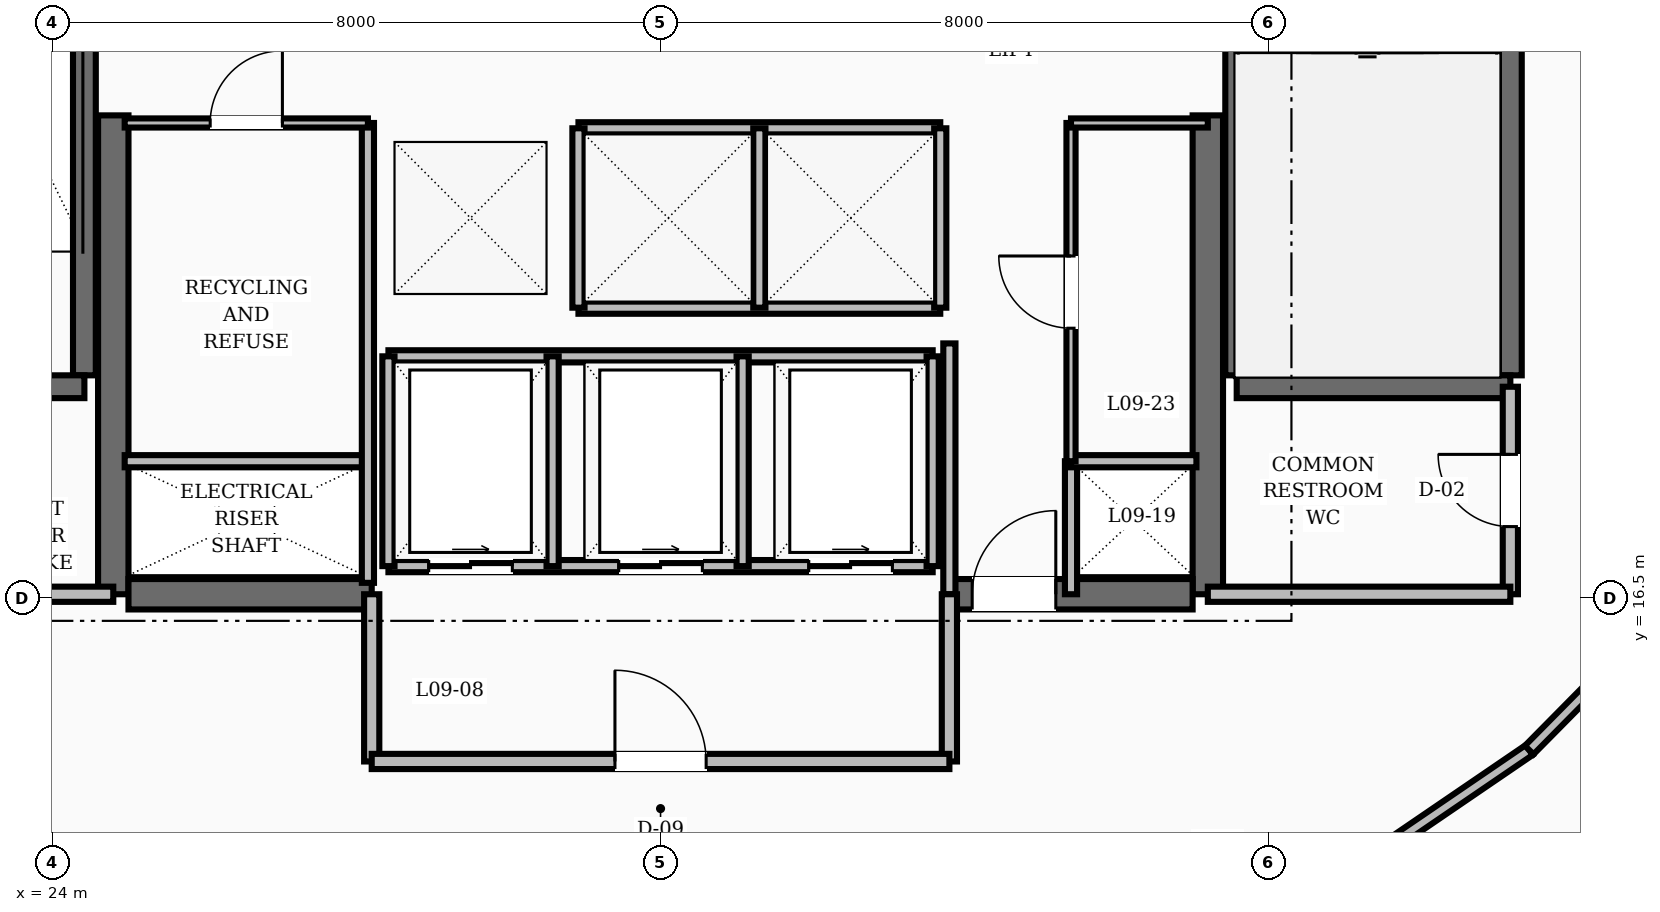
"""IFC4 building model, lengths in metres.
Left out: names, types, materials, properties, quantities, classifications, styles, units other than length and angle.
Written with IfcOpenShell. Run it as: python <this file> out.ifc"""

import sys

from ifc_helpers import new_model, si_unit, direction, frame, frame_2d, origin, place, context, subcontext, project, spatial, rectangle, extrude, element, fill, save


model = new_model("IFC4")
c1 = context("Model", 3, precision=1e-05, world=origin(), true_north=direction((0.0, 1.0)))
c2 = subcontext(c1, "Body", "Model", "MODEL_VIEW")
j1 = project(units=[si_unit("LENGTHUNIT", "METRE"), si_unit("PLANEANGLEUNIT", "RADIAN")], contexts=[c1])
p1 = place(None, origin())
s1 = spatial("IfcSite", under=j1, at=p1, CompositionType="ELEMENT")
p2 = place(p1, origin())
s2 = spatial("IfcBuilding", under=s1, at=p2, CompositionType="ELEMENT")
p3 = place(p2, frame((0.0, 0.0, 41.2)))
s3 = spatial("IfcBuildingStorey", under=s2, at=p3, CompositionType="ELEMENT", Elevation=41.2)
for number, where, z_axis, x_axis in (
    (1, (24.8, 16.55, 0.0), (0.0, 0.0, 1.0), (0.0, 1.0, 0.0)),
    (2, (39.2, 16.55, 0.0), (0.0, 0.0, 1.0), (0.0, 1.0, 0.0)),
):
    element("IfcWall", number, at=place(p3, frame(where, z_axis=z_axis, x_axis=x_axis)), inside=s3, PredefinedType="SHEAR", context=c2, shape_type="SweptSolid", body=[
        extrude(rectangle(XDim=6.3, YDim=0.4, at=frame_2d((3.15, 0.0))), origin(), (0.0, 0.0, 1.0), 3.6),
    ])
p4 = place(p3, frame((25.0, 16.55, 0.0), z_axis=(0.0, 0.0, 1.0), x_axis=(1.0, 0.0, 0.0)))
e3 = element("IfcWall", 3, at=p4, inside=s3, PredefinedType="SHEAR", context=c2, shape_type="SweptSolid", body=[
    extrude(rectangle(XDim=3.2, YDim=0.4, at=frame_2d((1.6, 0.0))), origin(), (0.0, 0.0, 1.0), 3.6),
])
p5 = place(p3, frame((35.8, 16.55, 0.0), z_axis=(0.0, 0.0, 1.0), x_axis=(1.0, 0.0, 0.0)))
e4 = element("IfcWall", 4, at=p5, inside=s3, PredefinedType="SHEAR", context=c2, shape_type="SweptSolid", body=[
    extrude(rectangle(XDim=3.2, YDim=0.4, at=frame_2d((1.6, 0.0))), origin(), (0.0, 0.0, 1.0), 3.6),
])
p6 = place(p5, frame((0.3, 0.0, 0.0)))
e5 = element("IfcOpeningElement", 5, at=p6, cuts=e4, PredefinedType="OPENING", context=c2, shape_type="SweptSolid", body=[
    extrude(rectangle(XDim=1.1, YDim=2.1, at=frame_2d((0.55, 1.05))), frame((0.0, 0.21, 0.0), z_axis=(0.0, -1.0, 0.0), x_axis=(1.0, 0.0, 0.0)), (0.0, 0.0, 1.0), 0.42),
])
p7 = place(p3, frame((24.42, 19.43, 0.0), z_axis=(0.0, 0.0, 1.0), x_axis=(0.0, 1.0, 0.0)))
e6 = element("IfcWall", 6, at=p7, inside=s3, PredefinedType="SHEAR", context=c2, shape_type="SweptSolid", body=[
    extrude(rectangle(XDim=8.74, YDim=0.3, at=frame_2d((4.37, 0.0))), origin(), (0.0, 0.0, 1.0), 3.6),
])
p8 = place(p3, frame((20.82, 19.28, 0.0), z_axis=(0.0, 0.0, 1.0), x_axis=(1.0, 0.0, 0.0)))
e7 = element("IfcWall", 7, at=p8, inside=s3, PredefinedType="SHEAR", context=c2, shape_type="SweptSolid", body=[
    extrude(rectangle(XDim=3.6, YDim=0.3, at=frame_2d((1.8, 0.0))), origin(), (0.0, 0.0, 1.0), 3.6),
])
p9 = place(p8, frame((1.3, 0.0, 0.0)))
e8 = element("IfcOpeningElement", 8, at=p9, cuts=e7, PredefinedType="OPENING", context=c2, shape_type="SweptSolid", body=[
    extrude(rectangle(XDim=1.1, YDim=2.1, at=frame_2d((0.55, 1.05))), frame((0.0, 0.16, 0.0), z_axis=(0.0, -1.0, 0.0), x_axis=(1.0, 0.0, 0.0)), (0.0, 0.0, 1.0), 0.32),
])
for number, where, z_axis, x_axis in (
    (9, (43.18, 19.43, 0.0), (0.0, 0.0, 1.0), (0.0, 1.0, 0.0)),
    (10, (39.58, 19.43, 0.0), (0.0, 0.0, 1.0), (0.0, 1.0, 0.0)),
):
    element("IfcWall", number, at=place(p3, frame(where, z_axis=z_axis, x_axis=x_axis)), inside=s3, PredefinedType="SHEAR", context=c2, shape_type="SweptSolid", body=[
        extrude(rectangle(XDim=8.74, YDim=0.3, at=frame_2d((4.37, 0.0))), origin(), (0.0, 0.0, 1.0), 3.6),
    ])
p10 = place(p3, frame((39.58, 19.28, 0.0), z_axis=(0.0, 0.0, 1.0), x_axis=(1.0, 0.0, 0.0)))
e11 = element("IfcWall", 11, at=p10, inside=s3, PredefinedType="SHEAR", context=c2, shape_type="SweptSolid", body=[
    extrude(rectangle(XDim=3.6, YDim=0.3, at=frame_2d((1.8, 0.0))), origin(), (0.0, 0.0, 1.0), 3.6),
])
p11 = place(p3, frame((20.82, 16.55, 0.0), z_axis=(0.0, 0.0, 1.0), x_axis=(1.0, 0.0, 0.0)))
e12 = element("IfcWall", 12, at=p11, inside=s3, PredefinedType="SOLIDWALL", context=c2, shape_type="SweptSolid", body=[
    extrude(rectangle(XDim=3.98, YDim=0.2, at=frame_2d((1.99, 0.0))), origin(), (0.0, 0.0, 1.0), 2.61),
])
p12 = place(p3, frame((43.18, 16.55, 0.0), z_axis=(0.0, 0.0, 1.0), x_axis=(0.0, 1.0, 0.0)))
e13 = element("IfcWall", 13, at=p12, inside=s3, PredefinedType="SOLIDWALL", context=c2, shape_type="SweptSolid", body=[
    extrude(rectangle(XDim=2.73, YDim=0.2, at=frame_2d((1.365, 0.0))), origin(), (0.0, 0.0, 1.0), 2.61),
])
p13 = place(p12, frame((0.89, 0.0, 0.0)))
e14 = element("IfcOpeningElement", 14, at=p13, cuts=e13, PredefinedType="OPENING", context=c2, shape_type="SweptSolid", body=[
    extrude(rectangle(XDim=0.95, YDim=2.1, at=frame_2d((0.475, 1.05))), frame((0.0, 0.11, 0.0), z_axis=(0.0, -1.0, 0.0), x_axis=(1.0, 0.0, 0.0)), (0.0, 0.0, 1.0), 0.22),
])
p14 = place(p3, frame((39.2, 16.55, 0.0), z_axis=(0.0, 0.0, 1.0), x_axis=(1.0, 0.0, 0.0)))
e15 = element("IfcWall", 15, at=p14, inside=s3, PredefinedType="SOLIDWALL", context=c2, shape_type="SweptSolid", body=[
    extrude(rectangle(XDim=3.98, YDim=0.2, at=frame_2d((1.99, 0.0))), origin(), (0.0, 0.0, 1.0), 2.61),
])
p15 = place(p3, frame((35.8, 16.55, 0.0), z_axis=(0.0, 0.0, 1.0), x_axis=(0.0, 1.0, 0.0)))
e16 = element("IfcWall", 16, at=p15, inside=s3, PredefinedType="SOLIDWALL", context=c2, shape_type="SweptSolid", body=[
    extrude(rectangle(XDim=3.3, YDim=0.16, at=frame_2d((1.65, 0.0))), origin(), (0.0, 0.0, 1.0), 2.61),
])
p16 = place(p3, frame((37.4, 16.55, 0.0), z_axis=(0.0, 0.0, 1.0), x_axis=(0.0, 1.0, 0.0)))
e17 = element("IfcWall", 17, at=p16, inside=s3, PredefinedType="SOLIDWALL", context=c2, shape_type="SweptSolid", body=[
    extrude(rectangle(XDim=1.75, YDim=0.16, at=frame_2d((0.875, 0.0))), origin(), (0.0, 0.0, 1.0), 2.61),
])
for number, where, z_axis, x_axis in (
    (18, (28.2, 14.35, 0.0), (0.0, 0.0, 1.0), (0.0, 1.0, 0.0)),
    (19, (35.8, 14.35, 0.0), (0.0, 0.0, 1.0), (0.0, 1.0, 0.0)),
):
    element("IfcWall", number, at=place(p3, frame(where, z_axis=z_axis, x_axis=x_axis)), inside=s3, PredefinedType="SOLIDWALL", context=c2, shape_type="SweptSolid", body=[
        extrude(rectangle(XDim=2.2, YDim=0.2, at=frame_2d((1.1, 0.0))), origin(), (0.0, 0.0, 1.0), 2.61),
    ])
p17 = place(p3, frame((28.2, 14.35, 0.0), z_axis=(0.0, 0.0, 1.0), x_axis=(1.0, 0.0, 0.0)))
e20 = element("IfcWall", 20, at=p17, inside=s3, PredefinedType="SOLIDWALL", context=c2, shape_type="SweptSolid", body=[
    extrude(rectangle(XDim=7.6, YDim=0.2, at=frame_2d((3.8, 0.0))), origin(), (0.0, 0.0, 1.0), 2.61),
])
p18 = place(p17, frame((3.2, 0.0, 0.0)))
e21 = element("IfcOpeningElement", 21, at=p18, cuts=e20, PredefinedType="OPENING", context=c2, shape_type="SweptSolid", body=[
    extrude(rectangle(XDim=1.2, YDim=2.1, at=frame_2d((0.6, 1.05))), frame((0.0, 0.11, 0.0), z_axis=(0.0, -1.0, 0.0), x_axis=(1.0, 0.0, 0.0)), (0.0, 0.0, 1.0), 0.22),
])
for number, where, z_axis, x_axis in (
    (22, (30.92, 22.68, 0.0), (0.0, 0.0, 1.0), (1.0, 0.0, 0.0)),
    (23, (30.92, 20.32, 0.0), (0.0, 0.0, 1.0), (1.0, 0.0, 0.0)),
):
    element("IfcWall", number, at=place(p3, frame(where, z_axis=z_axis, x_axis=x_axis)), inside=s3, PredefinedType="SOLIDWALL", context=c2, shape_type="SweptSolid", body=[
        extrude(rectangle(XDim=4.76, YDim=0.16, at=frame_2d((2.38, 0.0))), origin(), (0.0, 0.0, 1.0), 2.61),
    ])
for number, where, z_axis, x_axis in (
    (24, (30.92, 20.32, 0.0), (0.0, 0.0, 1.0), (0.0, 1.0, 0.0)),
    (25, (33.3, 20.32, 0.0), (0.0, 0.0, 1.0), (0.0, 1.0, 0.0)),
    (26, (35.68, 20.32, 0.0), (0.0, 0.0, 1.0), (0.0, 1.0, 0.0)),
):
    element("IfcWall", number, at=place(p3, frame(where, z_axis=z_axis, x_axis=x_axis)), inside=s3, PredefinedType="SOLIDWALL", context=c2, shape_type="SweptSolid", body=[
        extrude(rectangle(XDim=2.36, YDim=0.16, at=frame_2d((1.18, 0.0))), origin(), (0.0, 0.0, 1.0), 2.61),
    ])
p19 = place(p3, frame((28.42, 16.92, 0.0), z_axis=(0.0, 0.0, 1.0), x_axis=(1.0, 0.0, 0.0)))
e27 = element("IfcWall", 27, at=p19, inside=s3, PredefinedType="SOLIDWALL", context=c2, shape_type="SweptSolid", body=[
    extrude(rectangle(XDim=7.16, YDim=0.16, at=frame_2d((3.58, 0.0))), origin(), (0.0, 0.0, 1.0), 2.61),
])
p20 = place(p19, frame((0.53, 0.0, 0.0)))
e28 = element("IfcOpeningElement", 28, at=p20, cuts=e27, PredefinedType="OPENING", context=c2, shape_type="SweptSolid", body=[
    extrude(rectangle(XDim=1.1, YDim=2.15, at=frame_2d((0.55, 1.075))), frame((0.0, 0.09, 0.0), z_axis=(0.0, -1.0, 0.0), x_axis=(1.0, 0.0, 0.0)), (0.0, 0.0, 1.0), 0.18),
])
p21 = place(p19, frame((3.03, 0.0, 0.0)))
e29 = element("IfcOpeningElement", 29, at=p21, cuts=e27, PredefinedType="OPENING", context=c2, shape_type="SweptSolid", body=[
    extrude(rectangle(XDim=1.1, YDim=2.15, at=frame_2d((0.55, 1.075))), frame((0.0, 0.09, 0.0), z_axis=(0.0, -1.0, 0.0), x_axis=(1.0, 0.0, 0.0)), (0.0, 0.0, 1.0), 0.18),
])
p22 = place(p19, frame((5.53, 0.0, 0.0)))
e30 = element("IfcOpeningElement", 30, at=p22, cuts=e27, PredefinedType="OPENING", context=c2, shape_type="SweptSolid", body=[
    extrude(rectangle(XDim=1.1, YDim=2.15, at=frame_2d((0.55, 1.075))), frame((0.0, 0.09, 0.0), z_axis=(0.0, -1.0, 0.0), x_axis=(1.0, 0.0, 0.0)), (0.0, 0.0, 1.0), 0.18),
])
p23 = place(p3, frame((28.42, 19.68, 0.0), z_axis=(0.0, 0.0, 1.0), x_axis=(1.0, 0.0, 0.0)))
e31 = element("IfcWall", 31, at=p23, inside=s3, PredefinedType="SOLIDWALL", context=c2, shape_type="SweptSolid", body=[
    extrude(rectangle(XDim=7.16, YDim=0.16, at=frame_2d((3.58, 0.0))), origin(), (0.0, 0.0, 1.0), 2.61),
])
for number, where, z_axis, x_axis in (
    (32, (28.42, 16.92, 0.0), (0.0, 0.0, 1.0), (0.0, 1.0, 0.0)),
    (33, (30.58, 16.92, 0.0), (0.0, 0.0, 1.0), (0.0, 1.0, 0.0)),
    (34, (33.08, 16.92, 0.0), (0.0, 0.0, 1.0), (0.0, 1.0, 0.0)),
    (35, (35.58, 16.92, 0.0), (0.0, 0.0, 1.0), (0.0, 1.0, 0.0)),
):
    element("IfcWall", number, at=place(p3, frame(where, z_axis=z_axis, x_axis=x_axis)), inside=s3, PredefinedType="SOLIDWALL", context=c2, shape_type="SweptSolid", body=[
        extrude(rectangle(XDim=2.76, YDim=0.16, at=frame_2d((1.38, 0.0))), origin(), (0.0, 0.0, 1.0), 2.61),
    ])
p24 = place(p3, frame((24.95, 18.3, 0.0), z_axis=(0.0, 0.0, 1.0), x_axis=(1.0, 0.0, 0.0)))
e36 = element("IfcWall", 36, at=p24, inside=s3, PredefinedType="SOLIDWALL", context=c2, shape_type="SweptSolid", body=[
    extrude(rectangle(XDim=3.2, YDim=0.16, at=frame_2d((1.6, 0.0))), origin(), (0.0, 0.0, 1.0), 2.61),
])
p25 = place(p3, frame((28.15, 16.7, 0.0), z_axis=(0.0, 0.0, 1.0), x_axis=(0.0, 1.0, 0.0)))
e37 = element("IfcWall", 37, at=p25, inside=s3, PredefinedType="SOLIDWALL", context=c2, shape_type="SweptSolid", body=[
    extrude(rectangle(XDim=6.05, YDim=0.16, at=frame_2d((3.025, 0.0))), origin(), (0.0, 0.0, 1.0), 2.61),
])
p26 = place(p3, frame((37.4, 18.3, 0.0), z_axis=(0.0, 0.0, 1.0), x_axis=(1.0, 0.0, 0.0)))
e38 = element("IfcWall", 38, at=p26, inside=s3, PredefinedType="SOLIDWALL", context=c2, shape_type="SweptSolid", body=[
    extrude(rectangle(XDim=1.65, YDim=0.16, at=frame_2d((0.825, 0.0))), origin(), (0.0, 0.0, 1.0), 2.61),
])
p27 = place(p3, frame((24.95, 22.75, 0.0), z_axis=(0.0, 0.0, 1.0), x_axis=(1.0, 0.0, 0.0)))
e39 = element("IfcWall", 39, at=p27, inside=s3, PredefinedType="PARTITIONING", context=c2, shape_type="SweptSolid", body=[
    extrude(rectangle(XDim=3.2, YDim=0.12, at=frame_2d((1.6, 0.0))), origin(), (0.0, 0.0, 1.0), 2.61),
])
p28 = place(p27, frame((1.125, 0.0, 0.0)))
e40 = element("IfcOpeningElement", 40, at=p28, cuts=e39, PredefinedType="OPENING", context=c2, shape_type="SweptSolid", body=[
    extrude(rectangle(XDim=0.95, YDim=2.1, at=frame_2d((0.475, 1.05))), frame((0.0, 0.07, 0.0), z_axis=(0.0, -1.0, 0.0), x_axis=(1.0, 0.0, 0.0)), (0.0, 0.0, 1.0), 0.14),
])
p29 = place(p3, frame((37.4, 18.3, 0.0), z_axis=(0.0, 0.0, 1.0), x_axis=(0.0, 1.0, 0.0)))
e41 = element("IfcWall", 41, at=p29, inside=s3, PredefinedType="PARTITIONING", context=c2, shape_type="SweptSolid", body=[
    extrude(rectangle(XDim=4.45, YDim=0.12, at=frame_2d((2.225, 0.0))), origin(), (0.0, 0.0, 1.0), 2.61),
])
p30 = place(p29, frame((1.75, 0.0, 0.0)))
e42 = element("IfcOpeningElement", 42, at=p30, cuts=e41, PredefinedType="OPENING", context=c2, shape_type="SweptSolid", body=[
    extrude(rectangle(XDim=0.95, YDim=2.1, at=frame_2d((0.475, 1.05))), frame((0.0, 0.07, 0.0), z_axis=(0.0, -1.0, 0.0), x_axis=(1.0, 0.0, 0.0)), (0.0, 0.0, 1.0), 0.14),
])
p31 = place(p3, frame((37.4, 22.75, 0.0), z_axis=(0.0, 0.0, 1.0), x_axis=(1.0, 0.0, 0.0)))
e43 = element("IfcWall", 43, at=p31, inside=s3, PredefinedType="PARTITIONING", context=c2, shape_type="SweptSolid", body=[
    extrude(rectangle(XDim=1.8, YDim=0.12, at=frame_2d((0.9, 0.0))), origin(), (0.0, 0.0, 1.0), 2.61),
])
p32 = place(p3, frame((40.979, 12.83, 0.0), z_axis=(0.0, 0.0, 1.0), x_axis=(0.826112340767, 0.563505457323, 0.0)))
e44 = element("IfcWall", 44, at=p32, inside=s3, PredefinedType="SOLIDWALL", context=c2, shape_type="SweptSolid", body=[
    extrude(rectangle(XDim=2.965, YDim=0.16, at=frame_2d((1.482, 0.0))), origin(), (0.0, 0.0, 1.0), 2.61),
])
p33 = place(p3, frame((43.428, 14.501, 0.0), z_axis=(0.0, 0.0, 1.0), x_axis=(0.702569520063, 0.711615113301, 0.0)))
e45 = element("IfcWall", 45, at=p33, inside=s3, PredefinedType="SOLIDWALL", context=c2, shape_type="SweptSolid", body=[
    extrude(rectangle(XDim=2.861, YDim=0.16, at=frame_2d((1.43, 0.0))), origin(), (0.0, 0.0, 1.0), 2.61),
])
p34 = place(p3, frame((43.877, 9.552, 0.0), z_axis=(0.0, 0.0, 1.0), x_axis=(0.775978393893, 0.630759488404, 0.0)))
e46 = element("IfcWall", 46, at=p34, inside=s3, PredefinedType="PARTITIONING", context=c2, shape_type="SweptSolid", body=[
    extrude(rectangle(XDim=7.601, YDim=0.12, at=frame_2d((3.8, 0.0))), origin(), (0.0, 0.0, 1.0), 2.61),
])
p35 = place(p34, frame((3.325, 0.0, 0.0)))
e47 = element("IfcOpeningElement", 47, at=p35, cuts=e46, PredefinedType="OPENING", context=c2, shape_type="SweptSolid", body=[
    extrude(rectangle(XDim=0.95, YDim=2.1, at=frame_2d((0.475, 1.05))), frame((0.0, 0.07, 0.0), z_axis=(0.0, -1.0, 0.0), x_axis=(1.0, 0.0, 0.0)), (0.0, 0.0, 1.0), 0.14),
])
p36 = place(p13, origin())
e48 = element("IfcDoor", 48, at=p36, inside=s3, OperationType="SINGLE_SWING_RIGHT", PredefinedType="DOOR", context=c2, shape_type="SweptSolid", body=[
    extrude(rectangle(XDim=0.95, YDim=2.1, at=frame_2d((0.475, 1.05))), frame((0.0, 0.025, 0.0), z_axis=(0.0, -1.0, 0.0), x_axis=(1.0, 0.0, 0.0)), (0.0, 0.0, 1.0), 0.05),
])
fill(e14, e48)
p37 = place(p6, origin())
e49 = element("IfcDoor", 49, at=p37, inside=s3, OperationType="SINGLE_SWING_RIGHT", PredefinedType="DOOR", context=c2, shape_type="SweptSolid", body=[
    extrude(rectangle(XDim=1.1, YDim=2.1, at=frame_2d((0.55, 1.05))), frame((0.0, 0.025, 0.0), z_axis=(0.0, -1.0, 0.0), x_axis=(1.0, 0.0, 0.0)), (0.0, 0.0, 1.0), 0.05),
])
fill(e5, e49)
p38 = place(p18, origin())
e50 = element("IfcDoor", 50, at=p38, inside=s3, OperationType="SINGLE_SWING_LEFT", PredefinedType="DOOR", context=c2, shape_type="SweptSolid", body=[
    extrude(rectangle(XDim=1.2, YDim=2.1, at=frame_2d((0.6, 1.05))), frame((0.0, 0.025, 0.0), z_axis=(0.0, -1.0, 0.0), x_axis=(1.0, 0.0, 0.0)), (0.0, 0.0, 1.0), 0.05),
])
fill(e21, e50)
p39 = place(p20, origin())
e51 = element("IfcDoor", 51, at=p39, inside=s3, OperationType="SLIDING_TO_RIGHT", PredefinedType="DOOR", context=c2, shape_type="SweptSolid", body=[
    extrude(rectangle(XDim=1.1, YDim=2.15, at=frame_2d((0.55, 1.075))), frame((0.0, 0.025, 0.0), z_axis=(0.0, -1.0, 0.0), x_axis=(1.0, 0.0, 0.0)), (0.0, 0.0, 1.0), 0.05),
])
fill(e28, e51)
p40 = place(p21, origin())
e52 = element("IfcDoor", 52, at=p40, inside=s3, OperationType="SLIDING_TO_RIGHT", PredefinedType="DOOR", context=c2, shape_type="SweptSolid", body=[
    extrude(rectangle(XDim=1.1, YDim=2.15, at=frame_2d((0.55, 1.075))), frame((0.0, 0.025, 0.0), z_axis=(0.0, -1.0, 0.0), x_axis=(1.0, 0.0, 0.0)), (0.0, 0.0, 1.0), 0.05),
])
fill(e29, e52)
p41 = place(p22, origin())
e53 = element("IfcDoor", 53, at=p41, inside=s3, OperationType="SLIDING_TO_RIGHT", PredefinedType="DOOR", context=c2, shape_type="SweptSolid", body=[
    extrude(rectangle(XDim=1.1, YDim=2.15, at=frame_2d((0.55, 1.075))), frame((0.0, 0.025, 0.0), z_axis=(0.0, -1.0, 0.0), x_axis=(1.0, 0.0, 0.0)), (0.0, 0.0, 1.0), 0.05),
])
fill(e30, e53)
p42 = place(p28, origin())
e54 = element("IfcDoor", 54, at=p42, inside=s3, OperationType="SINGLE_SWING_RIGHT", PredefinedType="DOOR", context=c2, shape_type="SweptSolid", body=[
    extrude(rectangle(XDim=0.95, YDim=2.1, at=frame_2d((0.475, 1.05))), frame((0.0, 0.025, 0.0), z_axis=(0.0, -1.0, 0.0), x_axis=(1.0, 0.0, 0.0)), (0.0, 0.0, 1.0), 0.05),
])
fill(e40, e54)
p43 = place(p30, origin())
e55 = element("IfcDoor", 55, at=p43, inside=s3, OperationType="SINGLE_SWING_RIGHT", PredefinedType="DOOR", context=c2, shape_type="SweptSolid", body=[
    extrude(rectangle(XDim=0.95, YDim=2.1, at=frame_2d((0.475, 1.05))), frame((0.0, 0.025, 0.0), z_axis=(0.0, -1.0, 0.0), x_axis=(1.0, 0.0, 0.0)), (0.0, 0.0, 1.0), 0.05),
])
fill(e42, e55)
save(model, sys.argv[1])
